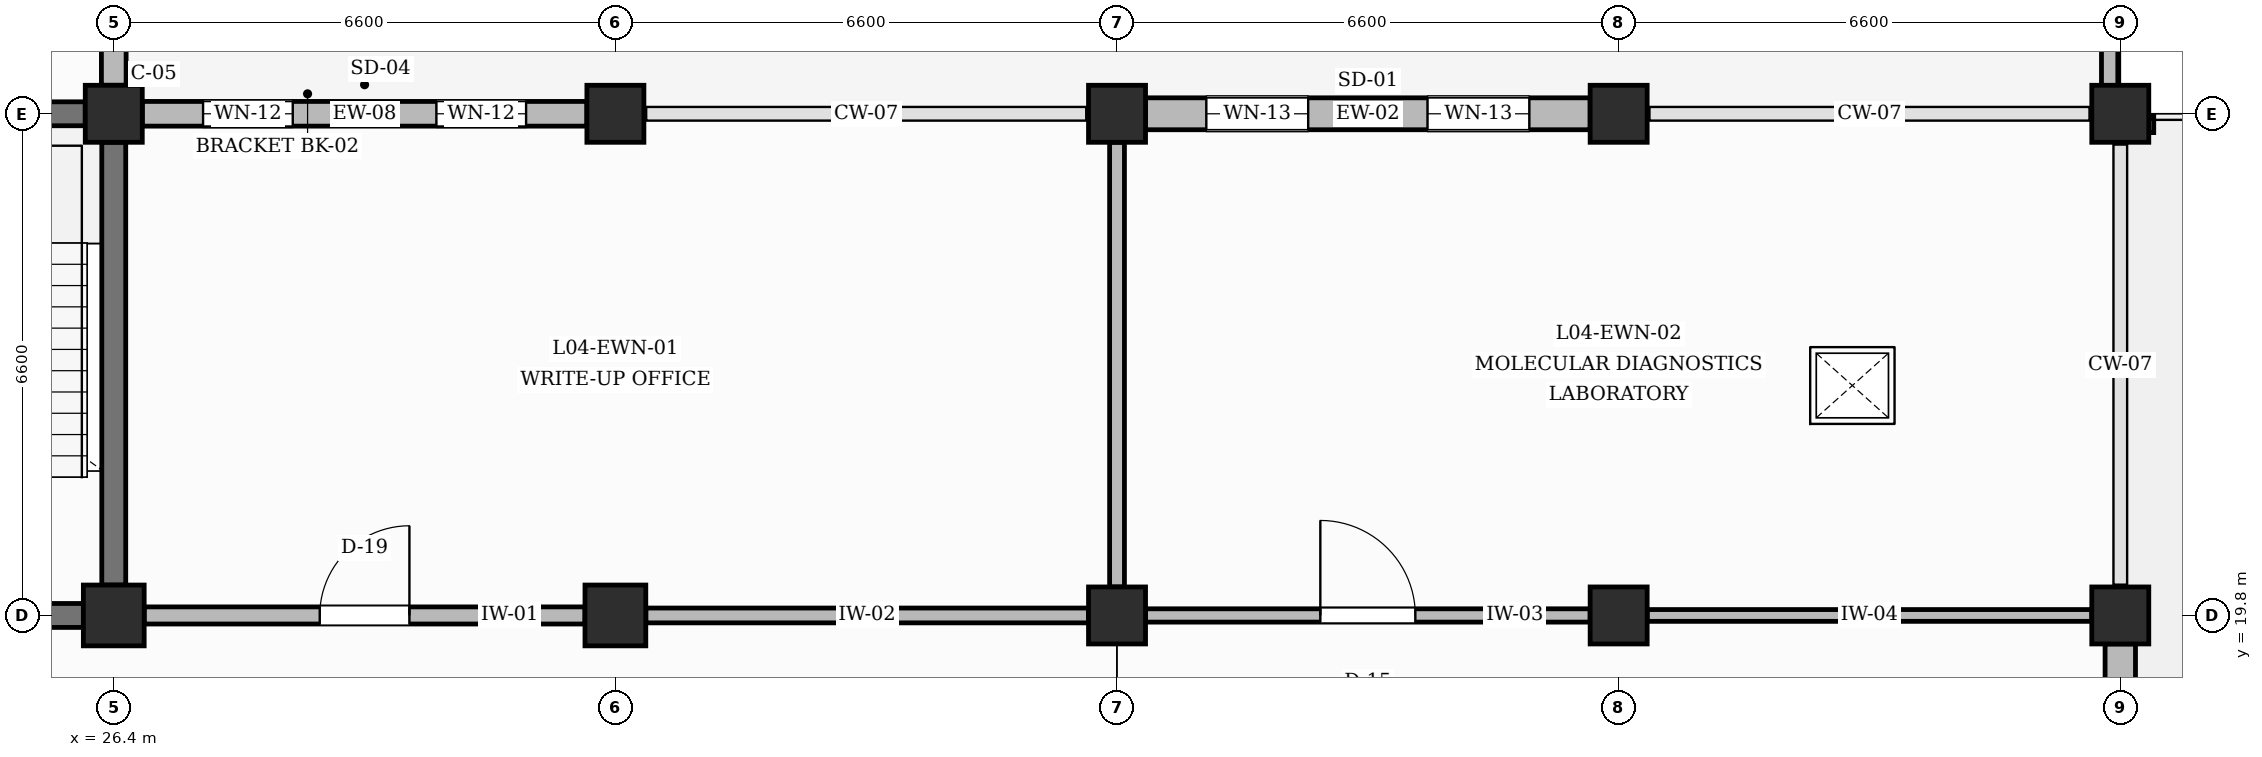
"""IFC4 building model, lengths in metres.
Left out: names, types, materials, properties, quantities, classifications, styles, units other than length and angle.
Written with IfcOpenShell. Run it as: python <this file> out.ifc"""

import sys

from ifc_helpers import new_model, si_unit, direction, frame, frame_2d, origin, origin_2d, place, context, subcontext, project, spatial, rectangle, extrude, element, fill, save


model = new_model("IFC4")
c1 = context("Model", 3, precision=1e-05, world=origin(), true_north=direction((0.0, 1.0)))
c2 = subcontext(c1, "Body", "Model", "MODEL_VIEW")
j1 = project(units=[si_unit("LENGTHUNIT", "METRE"), si_unit("PLANEANGLEUNIT", "RADIAN")], contexts=[c1])
p1 = place(None, origin())
s1 = spatial("IfcSite", under=j1, at=p1, CompositionType="ELEMENT")
p2 = place(p1, origin())
s2 = spatial("IfcBuilding", under=s1, at=p2, CompositionType="ELEMENT")
p3 = place(p2, frame((0.0, 0.0, 18.6)))
s3 = spatial("IfcBuildingStorey", under=s2, at=p3, CompositionType="ELEMENT", Elevation=18.6)
p4 = place(p3, frame((26.4, 19.8, 0.0), z_axis=(0.0, 0.0, 1.0), x_axis=(1.0, 0.0, 0.0)))
e1 = element("IfcColumn", 1, at=p4, inside=s3, PredefinedType="COLUMN", context=c2, shape_type="SweptSolid", body=[
    extrude(rectangle(XDim=0.8, YDim=0.8, at=origin_2d()), origin(), (0.0, 0.0, 1.0), 4.2),
])
p5 = place(p3, frame((26.4, 26.4, 0.0), z_axis=(0.0, 0.0, 1.0), x_axis=(1.0, 0.0, 0.0)))
e2 = element("IfcColumn", 2, at=p5, inside=s3, PredefinedType="COLUMN", context=c2, shape_type="SweptSolid", body=[
    extrude(rectangle(XDim=0.75, YDim=0.75, at=origin_2d()), origin(), (0.0, 0.0, 1.0), 4.2),
])
p6 = place(p3, frame((33.0, 19.8, 0.0), z_axis=(0.0, 0.0, 1.0), x_axis=(1.0, 0.0, 0.0)))
e3 = element("IfcColumn", 3, at=p6, inside=s3, PredefinedType="COLUMN", context=c2, shape_type="SweptSolid", body=[
    extrude(rectangle(XDim=0.8, YDim=0.8, at=origin_2d()), origin(), (0.0, 0.0, 1.0), 4.2),
])
for number, where, z_axis, x_axis in (
    (4, (33.0, 26.4, 0.0), (0.0, 0.0, 1.0), (1.0, 0.0, 0.0)),
    (5, (39.6, 19.8, 0.0), (0.0, 0.0, 1.0), (1.0, 0.0, 0.0)),
    (6, (39.6, 26.4, 0.0), (0.0, 0.0, 1.0), (1.0, 0.0, 0.0)),
    (7, (46.2, 19.8, 0.0), (0.0, 0.0, 1.0), (1.0, 0.0, 0.0)),
    (8, (46.2, 26.4, 0.0), (0.0, 0.0, 1.0), (1.0, 0.0, 0.0)),
    (9, (52.8, 19.8, 0.0), (0.0, 0.0, 1.0), (1.0, 0.0, 0.0)),
    (10, (52.8, 26.4, 0.0), (0.0, 0.0, 1.0), (1.0, 0.0, 0.0)),
):
    element("IfcColumn", number, at=place(p3, frame(where, z_axis=z_axis, x_axis=x_axis)), inside=s3, PredefinedType="COLUMN", context=c2, shape_type="SweptSolid", body=[
        extrude(rectangle(XDim=0.75, YDim=0.75, at=origin_2d()), origin(), (0.0, 0.0, 1.0), 4.2),
    ])
p7 = place(p3, frame((26.4, 26.775, 0.0), z_axis=(0.0, 0.0, 1.0), x_axis=(0.0, 1.0, 0.0)))
e11 = element("IfcWall", 11, at=p7, inside=s3, PredefinedType="SOLIDWALL", context=c2, shape_type="SweptSolid", body=[
    extrude(rectangle(XDim=5.85, YDim=0.325, at=frame_2d((2.925, 0.0))), origin(), (0.0, 0.0, 1.0), 3.26),
])
p8 = place(p7, frame((0.8, 0.0, 0.95)))
e12 = element("IfcOpeningElement", 12, at=p8, cuts=e11, PredefinedType="OPENING", context=c2, shape_type="SweptSolid", body=[
    extrude(rectangle(XDim=1.02, YDim=1.52, at=frame_2d((0.51, 0.76))), frame((0.0, 0.172, 0.0), z_axis=(0.0, -1.0, 0.0), x_axis=(1.0, 0.0, 0.0)), (0.0, 0.0, 1.0), 0.345),
])
p9 = place(p7, frame((4.03, 0.0, 0.95)))
e13 = element("IfcOpeningElement", 13, at=p9, cuts=e11, PredefinedType="OPENING", context=c2, shape_type="SweptSolid", body=[
    extrude(rectangle(XDim=1.02, YDim=1.52, at=frame_2d((0.51, 0.76))), frame((0.0, 0.172, 0.0), z_axis=(0.0, -1.0, 0.0), x_axis=(1.0, 0.0, 0.0)), (0.0, 0.0, 1.0), 0.345),
])
p10 = place(p3, frame((26.775, 26.4, 0.0), z_axis=(0.0, 0.0, 1.0), x_axis=(1.0, 0.0, 0.0)))
e14 = element("IfcWall", 14, at=p10, inside=s3, PredefinedType="SOLIDWALL", context=c2, shape_type="SweptSolid", body=[
    extrude(rectangle(XDim=5.85, YDim=0.325, at=frame_2d((2.925, 0.0))), origin(), (0.0, 0.0, 1.0), 3.26),
])
p11 = place(p10, frame((0.8, 0.0, 0.95)))
e15 = element("IfcOpeningElement", 15, at=p11, cuts=e14, PredefinedType="OPENING", context=c2, shape_type="SweptSolid", body=[
    extrude(rectangle(XDim=1.18, YDim=1.96, at=frame_2d((0.59, 0.98))), frame((0.0, 0.172, 0.0), z_axis=(0.0, -1.0, 0.0), x_axis=(1.0, 0.0, 0.0)), (0.0, 0.0, 1.0), 0.345),
])
p12 = place(p10, frame((3.87, 0.0, 0.95)))
e16 = element("IfcOpeningElement", 16, at=p12, cuts=e14, PredefinedType="OPENING", context=c2, shape_type="SweptSolid", body=[
    extrude(rectangle(XDim=1.18, YDim=1.96, at=frame_2d((0.59, 0.98))), frame((0.0, 0.172, 0.0), z_axis=(0.0, -1.0, 0.0), x_axis=(1.0, 0.0, 0.0)), (0.0, 0.0, 1.0), 0.345),
])
p13 = place(p3, frame((39.975, 26.4, 0.0), z_axis=(0.0, 0.0, 1.0), x_axis=(1.0, 0.0, 0.0)))
e17 = element("IfcWall", 17, at=p13, inside=s3, PredefinedType="SOLIDWALL", context=c2, shape_type="SweptSolid", body=[
    extrude(rectangle(XDim=5.85, YDim=0.42, at=frame_2d((2.925, 0.0))), origin(), (0.0, 0.0, 1.0), 3.26),
])
p14 = place(p13, frame((0.8, 0.0, 0.95)))
e18 = element("IfcOpeningElement", 18, at=p14, cuts=e17, PredefinedType="OPENING", context=c2, shape_type="SweptSolid", body=[
    extrude(rectangle(XDim=1.34, YDim=1.3, at=frame_2d((0.67, 0.65))), frame((0.0, 0.22, 0.0), z_axis=(0.0, -1.0, 0.0), x_axis=(1.0, 0.0, 0.0)), (0.0, 0.0, 1.0), 0.44),
])
p15 = place(p13, frame((3.71, 0.0, 0.95)))
e19 = element("IfcOpeningElement", 19, at=p15, cuts=e17, PredefinedType="OPENING", context=c2, shape_type="SweptSolid", body=[
    extrude(rectangle(XDim=1.34, YDim=1.3, at=frame_2d((0.67, 0.65))), frame((0.0, 0.22, 0.0), z_axis=(0.0, -1.0, 0.0), x_axis=(1.0, 0.0, 0.0)), (0.0, 0.0, 1.0), 0.44),
])
p16 = place(p3, frame((52.8, 13.575, 0.0), z_axis=(0.0, 0.0, 1.0), x_axis=(0.0, 1.0, 0.0)))
e20 = element("IfcWall", 20, at=p16, inside=s3, PredefinedType="SOLIDWALL", context=c2, shape_type="SweptSolid", body=[
    extrude(rectangle(XDim=5.85, YDim=0.4, at=frame_2d((2.925, 0.0))), origin(), (0.0, 0.0, 1.0), 3.26),
])
p17 = place(p16, frame((2.25, 0.0, 0.0)))
e21 = element("IfcOpeningElement", 21, at=p17, cuts=e20, PredefinedType="OPENING", context=c2, shape_type="SweptSolid", body=[
    extrude(rectangle(XDim=1.35, YDim=2.25, at=frame_2d((0.675, 1.125))), frame((0.0, 0.21, 0.0), z_axis=(0.0, -1.0, 0.0), x_axis=(1.0, 0.0, 0.0)), (0.0, 0.0, 1.0), 0.42),
])
p18 = place(p3, frame((53.08, 26.26, 0.0), z_axis=(0.0, 0.0, 1.0), x_axis=(1.0, 0.0, 0.0)))
e22 = element("IfcWall", 22, at=p18, inside=s3, PredefinedType="PARAPET", context=c2, shape_type="SweptSolid", body=[
    extrude(rectangle(XDim=0.16, YDim=0.215, at=frame_2d((0.08, 0.0))), origin(), (0.0, 0.0, 1.0), 1.15),
])
p19 = place(p3, frame((52.66, 26.7, 0.0), z_axis=(0.0, 0.0, 1.0), x_axis=(0.0, 1.0, 0.0)))
e23 = element("IfcWall", 23, at=p19, inside=s3, PredefinedType="PARAPET", context=c2, shape_type="SweptSolid", body=[
    extrude(rectangle(XDim=6.0, YDim=0.215, at=frame_2d((3.0, 0.0))), origin(), (0.0, 0.0, 1.0), 1.15),
])
p20 = place(p3, frame((20.2, 19.8, 0.0), z_axis=(0.0, 0.0, 1.0), x_axis=(1.0, 0.0, 0.0)))
e24 = element("IfcWall", 24, at=p20, inside=s3, PredefinedType="SHEAR", context=c2, shape_type="SweptSolid", body=[
    extrude(rectangle(XDim=5.8, YDim=0.315, at=frame_2d((2.9, 0.0))), origin(), (0.0, 0.0, 1.0), 3.16),
])
p21 = place(p20, frame((2.325, 0.0, 0.0)))
e25 = element("IfcOpeningElement", 25, at=p21, cuts=e24, PredefinedType="OPENING", context=c2, shape_type="SweptSolid", body=[
    extrude(rectangle(XDim=1.15, YDim=2.2, at=frame_2d((0.575, 1.1))), frame((0.0, 0.167, 0.0), z_axis=(0.0, -1.0, 0.0), x_axis=(1.0, 0.0, 0.0)), (0.0, 0.0, 1.0), 0.335),
])
for number, where, z_axis, x_axis in (
    (26, (20.2, 26.4, 0.0), (0.0, 0.0, 1.0), (1.0, 0.0, 0.0)),
    (27, (26.4, 20.2, 0.0), (0.0, 0.0, 1.0), (0.0, 1.0, 0.0)),
):
    element("IfcWall", number, at=place(p3, frame(where, z_axis=z_axis, x_axis=x_axis)), inside=s3, PredefinedType="SHEAR", context=c2, shape_type="SweptSolid", body=[
        extrude(rectangle(XDim=5.825, YDim=0.315, at=frame_2d((2.913, 0.0))), origin(), (0.0, 0.0, 1.0), 3.16),
    ])
p22 = place(p3, frame((26.8, 19.8, 0.0), z_axis=(0.0, 0.0, 1.0), x_axis=(1.0, 0.0, 0.0)))
e28 = element("IfcWall", 28, at=p22, inside=s3, PredefinedType="PARTITIONING", context=c2, shape_type="SweptSolid", body=[
    extrude(rectangle(XDim=5.8, YDim=0.225, at=frame_2d((2.9, 0.0))), origin(), (0.0, 0.0, 1.0), 3.16),
])
p23 = place(p22, frame((2.31, 0.0, 0.0)))
e29 = element("IfcOpeningElement", 29, at=p23, cuts=e28, PredefinedType="OPENING", context=c2, shape_type="SweptSolid", body=[
    extrude(rectangle(XDim=1.18, YDim=2.2, at=frame_2d((0.59, 1.1))), frame((0.0, 0.123, 0.0), z_axis=(0.0, -1.0, 0.0), x_axis=(1.0, 0.0, 0.0)), (0.0, 0.0, 1.0), 0.245),
])
p24 = place(p3, frame((33.4, 19.8, 0.0), z_axis=(0.0, 0.0, 1.0), x_axis=(1.0, 0.0, 0.0)))
e30 = element("IfcWall", 30, at=p24, inside=s3, PredefinedType="PARTITIONING", context=c2, shape_type="SweptSolid", body=[
    extrude(rectangle(XDim=5.825, YDim=0.195, at=frame_2d((2.913, 0.0))), origin(), (0.0, 0.0, 1.0), 3.16),
])
p25 = place(p3, frame((39.6, 20.175, 0.0), z_axis=(0.0, 0.0, 1.0), x_axis=(0.0, 1.0, 0.0)))
e31 = element("IfcWall", 31, at=p25, inside=s3, PredefinedType="PARTITIONING", context=c2, shape_type="SweptSolid", body=[
    extrude(rectangle(XDim=5.85, YDim=0.195, at=frame_2d((2.925, 0.0))), origin(), (0.0, 0.0, 1.0), 3.16),
])
p26 = place(p3, frame((39.975, 19.8, 0.0), z_axis=(0.0, 0.0, 1.0), x_axis=(1.0, 0.0, 0.0)))
e32 = element("IfcWall", 32, at=p26, inside=s3, PredefinedType="PARTITIONING", context=c2, shape_type="SweptSolid", body=[
    extrude(rectangle(XDim=5.85, YDim=0.175, at=frame_2d((2.925, 0.0))), origin(), (0.0, 0.0, 1.0), 3.16),
])
p27 = place(p26, frame((2.3, 0.0, 0.0)))
e33 = element("IfcOpeningElement", 33, at=p27, cuts=e32, PredefinedType="OPENING", context=c2, shape_type="SweptSolid", body=[
    extrude(rectangle(XDim=1.25, YDim=2.25, at=frame_2d((0.625, 1.125))), frame((0.0, 0.097, 0.0), z_axis=(0.0, -1.0, 0.0), x_axis=(1.0, 0.0, 0.0)), (0.0, 0.0, 1.0), 0.195),
])
p28 = place(p3, frame((46.575, 19.8, 0.0), z_axis=(0.0, 0.0, 1.0), x_axis=(1.0, 0.0, 0.0)))
e34 = element("IfcWall", 34, at=p28, inside=s3, PredefinedType="PARTITIONING", context=c2, shape_type="SweptSolid", body=[
    extrude(rectangle(XDim=5.85, YDim=0.155, at=frame_2d((2.925, 0.0))), origin(), (0.0, 0.0, 1.0), 3.16),
])
p29 = place(p11, origin())
e35 = element("IfcWindow", 35, at=p29, inside=s3, PartitioningType="SINGLE_PANEL", PredefinedType="WINDOW", context=c2, shape_type="SweptSolid", body=[
    extrude(rectangle(XDim=1.18, YDim=1.96, at=frame_2d((0.59, 0.98))), frame((0.0, 0.03, 0.0), z_axis=(0.0, -1.0, 0.0), x_axis=(1.0, 0.0, 0.0)), (0.0, 0.0, 1.0), 0.06),
])
fill(e15, e35)
p30 = place(p12, origin())
e36 = element("IfcWindow", 36, at=p30, inside=s3, PartitioningType="SINGLE_PANEL", PredefinedType="WINDOW", context=c2, shape_type="SweptSolid", body=[
    extrude(rectangle(XDim=1.18, YDim=1.96, at=frame_2d((0.59, 0.98))), frame((0.0, 0.03, 0.0), z_axis=(0.0, -1.0, 0.0), x_axis=(1.0, 0.0, 0.0)), (0.0, 0.0, 1.0), 0.06),
])
fill(e16, e36)
p31 = place(p14, origin())
e37 = element("IfcWindow", 37, at=p31, inside=s3, PartitioningType="SINGLE_PANEL", PredefinedType="WINDOW", context=c2, shape_type="SweptSolid", body=[
    extrude(rectangle(XDim=1.34, YDim=1.3, at=frame_2d((0.67, 0.65))), frame((0.0, 0.03, 0.0), z_axis=(0.0, -1.0, 0.0), x_axis=(1.0, 0.0, 0.0)), (0.0, 0.0, 1.0), 0.06),
])
fill(e18, e37)
p32 = place(p15, origin())
e38 = element("IfcWindow", 38, at=p32, inside=s3, PartitioningType="SINGLE_PANEL", PredefinedType="WINDOW", context=c2, shape_type="SweptSolid", body=[
    extrude(rectangle(XDim=1.34, YDim=1.3, at=frame_2d((0.67, 0.65))), frame((0.0, 0.03, 0.0), z_axis=(0.0, -1.0, 0.0), x_axis=(1.0, 0.0, 0.0)), (0.0, 0.0, 1.0), 0.06),
])
fill(e19, e38)
p33 = place(p23, origin())
e39 = element("IfcDoor", 39, at=p33, inside=s3, OperationType="SINGLE_SWING_RIGHT", PredefinedType="DOOR", context=c2, shape_type="SweptSolid", body=[
    extrude(rectangle(XDim=1.18, YDim=2.2, at=frame_2d((0.59, 1.1))), frame((0.0, 0.025, 0.0), z_axis=(0.0, -1.0, 0.0), x_axis=(1.0, 0.0, 0.0)), (0.0, 0.0, 1.0), 0.05),
])
fill(e29, e39)
p34 = place(p27, origin())
e40 = element("IfcDoor", 40, at=p34, inside=s3, OperationType="SINGLE_SWING_LEFT", PredefinedType="DOOR", context=c2, shape_type="SweptSolid", body=[
    extrude(rectangle(XDim=1.25, YDim=2.25, at=frame_2d((0.625, 1.125))), frame((0.0, 0.025, 0.0), z_axis=(0.0, -1.0, 0.0), x_axis=(1.0, 0.0, 0.0)), (0.0, 0.0, 1.0), 0.05),
])
fill(e33, e40)
save(model, sys.argv[1])
